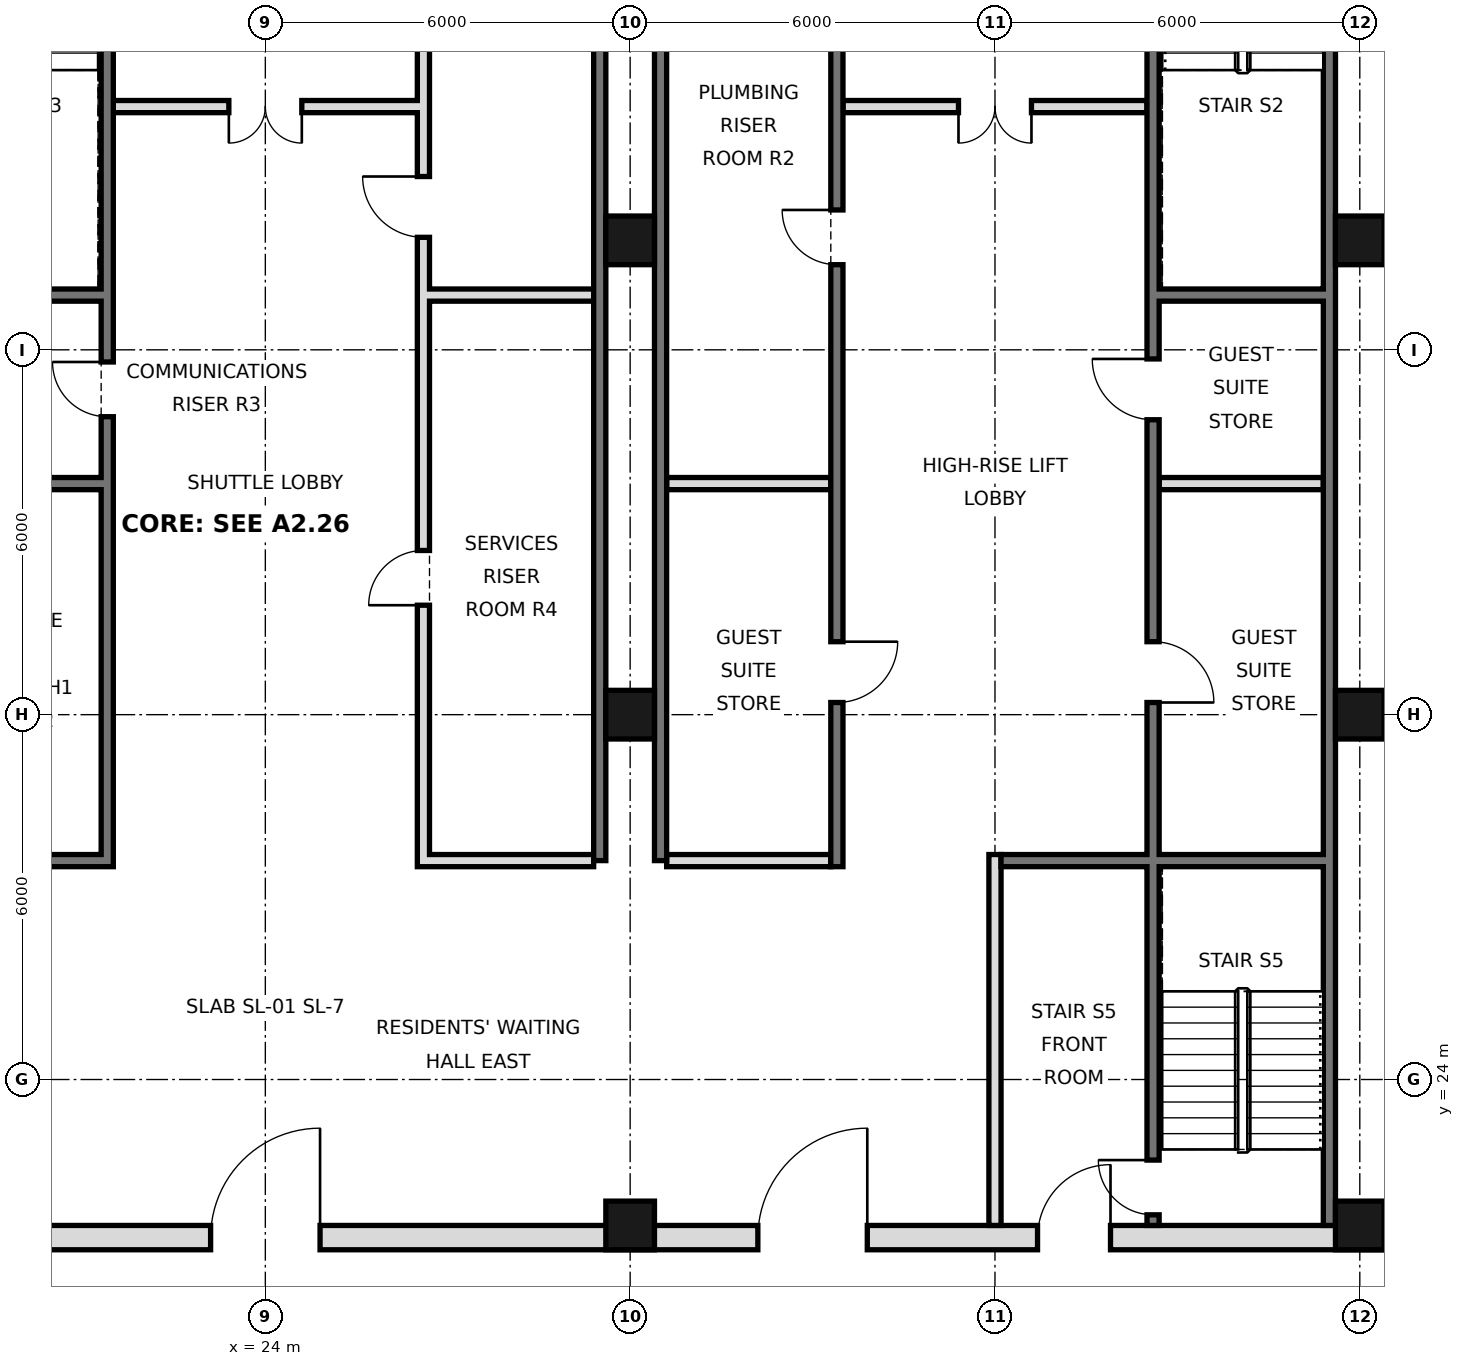
"""IFC4 building model, lengths in metres.
Left out: names, types, materials, properties, quantities, classifications, styles, units other than length and angle.
Written with IfcOpenShell. Run it as: python <this file> out.ifc"""

import sys

from ifc_helpers import new_model, si_unit, direction, frame, frame_2d, origin, origin_2d, place, context, subcontext, project, spatial, rectangle, hollow_rectangle, extrude, element, fill, save


model = new_model("IFC4")
c1 = context("Model", 3, precision=1e-05, world=origin(), true_north=direction((0.0, 1.0)))
c2 = subcontext(c1, "Body", "Model", "MODEL_VIEW")
j1 = project(units=[si_unit("LENGTHUNIT", "METRE"), si_unit("PLANEANGLEUNIT", "RADIAN")], contexts=[c1])
p1 = place(None, origin())
s1 = spatial("IfcSite", under=j1, at=p1, CompositionType="ELEMENT")
p2 = place(p1, origin())
s2 = spatial("IfcBuilding", under=s1, at=p2, CompositionType="ELEMENT")
p3 = place(p2, frame((0.0, 0.0, 103.4)))
s3 = spatial("IfcBuildingStorey", under=s2, at=p3, CompositionType="ELEMENT", Elevation=103.4)
for number, where, z_axis, x_axis in (
    (1, (30.0, 21.6, 0.0), (0.0, 0.0, 1.0), (1.0, 0.0, 0.0)),
    (2, (30.0, 30.0, 0.0), (0.0, 0.0, 1.0), (1.0, 0.0, 0.0)),
    (3, (30.0, 37.8, 0.0), (0.0, 0.0, 1.0), (1.0, 0.0, 0.0)),
    (4, (42.0, 21.6, 0.0), (0.0, 0.0, 1.0), (1.0, 0.0, 0.0)),
    (5, (42.0, 30.0, 0.0), (0.0, 0.0, 1.0), (1.0, 0.0, 0.0)),
    (6, (42.0, 37.8, 0.0), (0.0, 0.0, 1.0), (1.0, 0.0, 0.0)),
):
    element("IfcColumn", number, at=place(p3, frame(where, z_axis=z_axis, x_axis=x_axis)), inside=s3, PredefinedType="COLUMN", context=c2, shape_type="SweptSolid", body=[
        extrude(hollow_rectangle(XDim=0.8, YDim=0.8, WallThickness=0.05, at=origin_2d()), origin(), (0.0, 0.0, 1.0), 3.6),
    ])
p4 = place(p3, frame((41.5, 21.6, 0.0), z_axis=(0.0, 0.0, 1.0), x_axis=(0.0, 1.0, 0.0)))
e7 = element("IfcWall", 7, at=p4, inside=s3, PredefinedType="SOLIDWALL", context=c2, shape_type="SweptSolid", body=[
    extrude(rectangle(XDim=23.5, YDim=0.2, at=frame_2d((11.75, 0.0))), origin(), (0.0, 0.0, 1.0), 3.42),
])
for number, where, z_axis, x_axis in (
    (8, (29.5, 27.6, 0.0), (0.0, 0.0, 1.0), (0.0, 1.0, 0.0)),
    (9, (30.5, 27.6, 0.0), (0.0, 0.0, 1.0), (0.0, 1.0, 0.0)),
):
    element("IfcWall", number, at=place(p3, frame(where, z_axis=z_axis, x_axis=x_axis)), inside=s3, PredefinedType="SOLIDWALL", context=c2, shape_type="SweptSolid", body=[
        extrude(rectangle(XDim=17.5, YDim=0.2, at=frame_2d((8.75, 0.0))), origin(), (0.0, 0.0, 1.0), 3.42),
    ])
p5 = place(p3, frame((5.6, 21.4, 0.0), z_axis=(0.0, 0.0, 1.0), x_axis=(1.0, 0.0, 0.0)))
e10 = element("IfcWall", 10, at=p5, inside=s3, PredefinedType="SOLIDWALL", context=c2, shape_type="SweptSolid", body=[
    extrude(rectangle(XDim=36.8, YDim=0.4, at=frame_2d((18.4, 0.0))), origin(), (0.0, 0.0, 1.0), 3.42),
])
p6 = place(p5, frame((8.5, 0.0, 0.0)))
e11 = element("IfcOpeningElement", 11, at=p6, cuts=e10, PredefinedType="OPENING", context=c2, shape_type="SweptSolid", body=[
    extrude(rectangle(XDim=1.8, YDim=2.1, at=frame_2d((0.9, 1.05))), frame((0.0, 0.21, 0.0), z_axis=(0.0, -1.0, 0.0), x_axis=(1.0, 0.0, 0.0)), (0.0, 0.0, 1.0), 0.42),
])
p7 = place(p5, frame((17.5, 0.0, 0.0)))
e12 = element("IfcOpeningElement", 12, at=p7, cuts=e10, PredefinedType="OPENING", context=c2, shape_type="SweptSolid", body=[
    extrude(rectangle(XDim=1.8, YDim=2.1, at=frame_2d((0.9, 1.05))), frame((0.0, 0.21, 0.0), z_axis=(0.0, -1.0, 0.0), x_axis=(1.0, 0.0, 0.0)), (0.0, 0.0, 1.0), 0.42),
])
p8 = place(p5, frame((26.5, 0.0, 0.0)))
e13 = element("IfcOpeningElement", 13, at=p8, cuts=e10, PredefinedType="OPENING", context=c2, shape_type="SweptSolid", body=[
    extrude(rectangle(XDim=1.8, YDim=2.1, at=frame_2d((0.9, 1.05))), frame((0.0, 0.21, 0.0), z_axis=(0.0, -1.0, 0.0), x_axis=(1.0, 0.0, 0.0)), (0.0, 0.0, 1.0), 0.42),
])
p9 = place(p5, frame((4.5, 0.0, 0.0)))
e14 = element("IfcOpeningElement", 14, at=p9, cuts=e10, PredefinedType="OPENING", context=c2, shape_type="SweptSolid", body=[
    extrude(rectangle(XDim=1.2, YDim=2.1, at=frame_2d((0.6, 1.05))), frame((0.0, 0.21, 0.0), z_axis=(0.0, -1.0, 0.0), x_axis=(1.0, 0.0, 0.0)), (0.0, 0.0, 1.0), 0.42),
])
p10 = place(p5, frame((31.1, 0.0, 0.0)))
e15 = element("IfcOpeningElement", 15, at=p10, cuts=e10, PredefinedType="OPENING", context=c2, shape_type="SweptSolid", body=[
    extrude(rectangle(XDim=1.2, YDim=2.1, at=frame_2d((0.6, 1.05))), frame((0.0, 0.21, 0.0), z_axis=(0.0, -1.0, 0.0), x_axis=(1.0, 0.0, 0.0)), (0.0, 0.0, 1.0), 0.42),
])
p11 = place(p3, frame((21.4, 27.5, 0.0), z_axis=(0.0, 0.0, 1.0), x_axis=(0.0, 1.0, 0.0)))
e16 = element("IfcWall", 16, at=p11, inside=s3, PredefinedType="SOLIDWALL", context=c2, shape_type="SweptSolid", body=[
    extrude(rectangle(XDim=17.5, YDim=0.2, at=frame_2d((8.75, 0.0))), origin(), (0.0, 0.0, 1.0), 3.42),
])
p12 = place(p11, frame((16.2, 0.0, 0.0)))
e17 = element("IfcOpeningElement", 17, at=p12, cuts=e16, PredefinedType="OPENING", context=c2, shape_type="SweptSolid", body=[
    extrude(rectangle(XDim=1.0, YDim=2.1, at=frame_2d((0.5, 1.05))), frame((0.0, 0.11, 0.0), z_axis=(0.0, -1.0, 0.0), x_axis=(1.0, 0.0, 0.0)), (0.0, 0.0, 1.0), 0.22),
])
p13 = place(p11, frame((7.4, 0.0, 0.0)))
e18 = element("IfcOpeningElement", 18, at=p13, cuts=e16, PredefinedType="OPENING", context=c2, shape_type="SweptSolid", body=[
    extrude(rectangle(XDim=0.9, YDim=2.1, at=frame_2d((0.45, 1.05))), frame((0.0, 0.11, 0.0), z_axis=(0.0, -1.0, 0.0), x_axis=(1.0, 0.0, 0.0)), (0.0, 0.0, 1.0), 0.22),
])
p14 = place(p3, frame((26.6, 27.5, 0.0), z_axis=(0.0, 0.0, 1.0), x_axis=(0.0, 1.0, 0.0)))
e19 = element("IfcWall", 19, at=p14, inside=s3, PredefinedType="SOLIDWALL", context=c2, shape_type="SweptSolid", body=[
    extrude(rectangle(XDim=17.5, YDim=0.2, at=frame_2d((8.75, 0.0))), origin(), (0.0, 0.0, 1.0), 3.42),
])
p15 = place(p14, frame((4.3, 0.0, 0.0)))
e20 = element("IfcOpeningElement", 20, at=p15, cuts=e19, PredefinedType="OPENING", context=c2, shape_type="SweptSolid", body=[
    extrude(rectangle(XDim=0.9, YDim=2.1, at=frame_2d((0.45, 1.05))), frame((0.0, 0.11, 0.0), z_axis=(0.0, -1.0, 0.0), x_axis=(1.0, 0.0, 0.0)), (0.0, 0.0, 1.0), 0.22),
])
p16 = place(p14, frame((10.35, 0.0, 0.0)))
e21 = element("IfcOpeningElement", 21, at=p16, cuts=e19, PredefinedType="OPENING", context=c2, shape_type="SweptSolid", body=[
    extrude(rectangle(XDim=1.0, YDim=2.1, at=frame_2d((0.5, 1.05))), frame((0.0, 0.11, 0.0), z_axis=(0.0, -1.0, 0.0), x_axis=(1.0, 0.0, 0.0)), (0.0, 0.0, 1.0), 0.22),
])
p17 = place(p3, frame((33.4, 27.5, 0.0), z_axis=(0.0, 0.0, 1.0), x_axis=(0.0, 1.0, 0.0)))
e22 = element("IfcWall", 22, at=p17, inside=s3, PredefinedType="SOLIDWALL", context=c2, shape_type="SweptSolid", body=[
    extrude(rectangle(XDim=17.5, YDim=0.2, at=frame_2d((8.75, 0.0))), origin(), (0.0, 0.0, 1.0), 3.42),
])
p18 = place(p17, frame((15.4, 0.0, 0.0)))
e23 = element("IfcOpeningElement", 23, at=p18, cuts=e22, PredefinedType="OPENING", context=c2, shape_type="SweptSolid", body=[
    extrude(rectangle(XDim=1.1, YDim=2.1, at=frame_2d((0.55, 1.05))), frame((0.0, 0.11, 0.0), z_axis=(0.0, -1.0, 0.0), x_axis=(1.0, 0.0, 0.0)), (0.0, 0.0, 1.0), 0.22),
])
p19 = place(p17, frame((2.7, 0.0, 0.0)))
e24 = element("IfcOpeningElement", 24, at=p19, cuts=e22, PredefinedType="OPENING", context=c2, shape_type="SweptSolid", body=[
    extrude(rectangle(XDim=1.0, YDim=2.1, at=frame_2d((0.5, 1.05))), frame((0.0, 0.11, 0.0), z_axis=(0.0, -1.0, 0.0), x_axis=(1.0, 0.0, 0.0)), (0.0, 0.0, 1.0), 0.22),
])
p20 = place(p17, frame((9.9, 0.0, 0.0)))
e25 = element("IfcOpeningElement", 25, at=p20, cuts=e22, PredefinedType="OPENING", context=c2, shape_type="SweptSolid", body=[
    extrude(rectangle(XDim=0.9, YDim=2.1, at=frame_2d((0.45, 1.05))), frame((0.0, 0.11, 0.0), z_axis=(0.0, -1.0, 0.0), x_axis=(1.0, 0.0, 0.0)), (0.0, 0.0, 1.0), 0.22),
])
p21 = place(p3, frame((36.0, 21.6, 0.0), z_axis=(0.0, 0.0, 1.0), x_axis=(0.0, 1.0, 0.0)))
e26 = element("IfcWall", 26, at=p21, inside=s3, PredefinedType="PARTITIONING", context=c2, shape_type="SweptSolid", body=[
    extrude(rectangle(XDim=6.1, YDim=0.2, at=frame_2d((3.05, 0.0))), origin(), (0.0, 0.0, 1.0), 3.42),
])
p22 = place(p3, frame((38.6, 21.6, 0.0), z_axis=(0.0, 0.0, 1.0), x_axis=(0.0, 1.0, 0.0)))
e27 = element("IfcWall", 27, at=p22, inside=s3, PredefinedType="SOLIDWALL", context=c2, shape_type="SweptSolid", body=[
    extrude(rectangle(XDim=23.4, YDim=0.2, at=frame_2d((11.7, 0.0))), origin(), (0.0, 0.0, 1.0), 3.42),
])
p23 = place(p22, frame((8.6, 0.0, 0.0)))
e28 = element("IfcOpeningElement", 28, at=p23, cuts=e27, PredefinedType="OPENING", context=c2, shape_type="SweptSolid", body=[
    extrude(rectangle(XDim=1.0, YDim=2.1, at=frame_2d((0.5, 1.05))), frame((0.0, 0.11, 0.0), z_axis=(0.0, -1.0, 0.0), x_axis=(1.0, 0.0, 0.0)), (0.0, 0.0, 1.0), 0.22),
])
p24 = place(p22, frame((13.25, 0.0, 0.0)))
e29 = element("IfcOpeningElement", 29, at=p24, cuts=e27, PredefinedType="OPENING", context=c2, shape_type="SweptSolid", body=[
    extrude(rectangle(XDim=1.0, YDim=2.1, at=frame_2d((0.5, 1.05))), frame((0.0, 0.11, 0.0), z_axis=(0.0, -1.0, 0.0), x_axis=(1.0, 0.0, 0.0)), (0.0, 0.0, 1.0), 0.22),
])
p25 = place(p22, frame((22.1, 0.0, 0.0)))
e30 = element("IfcOpeningElement", 30, at=p25, cuts=e27, PredefinedType="OPENING", context=c2, shape_type="SweptSolid", body=[
    extrude(rectangle(XDim=1.0, YDim=2.1, at=frame_2d((0.5, 1.05))), frame((0.0, 0.11, 0.0), z_axis=(0.0, -1.0, 0.0), x_axis=(1.0, 0.0, 0.0)), (0.0, 0.0, 1.0), 0.22),
])
p26 = place(p22, frame((0.175, 0.0, 0.0)))
e31 = element("IfcOpeningElement", 31, at=p26, cuts=e27, PredefinedType="OPENING", context=c2, shape_type="SweptSolid", body=[
    extrude(rectangle(XDim=0.9, YDim=2.1, at=frame_2d((0.45, 1.05))), frame((0.0, 0.11, 0.0), z_axis=(0.0, -1.0, 0.0), x_axis=(1.0, 0.0, 0.0)), (0.0, 0.0, 1.0), 0.22),
])
for number, where, z_axis, x_axis in (
    (32, (18.6, 27.6, 0.0), (0.0, 0.0, 1.0), (1.0, 0.0, 0.0)),
    (33, (26.7, 27.6, 0.0), (0.0, 0.0, 1.0), (1.0, 0.0, 0.0)),
):
    element("IfcWall", number, at=place(p3, frame(where, z_axis=z_axis, x_axis=x_axis)), inside=s3, PredefinedType="SOLIDWALL", context=c2, shape_type="SweptSolid", body=[
        extrude(rectangle(XDim=2.7, YDim=0.2, at=frame_2d((1.35, 0.0))), origin(), (0.0, 0.0, 1.0), 3.42),
    ])
p27 = place(p3, frame((30.6, 27.6, 0.0), z_axis=(0.0, 0.0, 1.0), x_axis=(1.0, 0.0, 0.0)))
e34 = element("IfcWall", 34, at=p27, inside=s3, PredefinedType="PARTITIONING", context=c2, shape_type="SweptSolid", body=[
    extrude(rectangle(XDim=2.7, YDim=0.2, at=frame_2d((1.35, 0.0))), origin(), (0.0, 0.0, 1.0), 3.42),
])
p28 = place(p3, frame((36.1, 27.6, 0.0), z_axis=(0.0, 0.0, 1.0), x_axis=(1.0, 0.0, 0.0)))
e35 = element("IfcWall", 35, at=p28, inside=s3, PredefinedType="SOLIDWALL", context=c2, shape_type="SweptSolid", body=[
    extrude(rectangle(XDim=5.3, YDim=0.2, at=frame_2d((2.65, 0.0))), origin(), (0.0, 0.0, 1.0), 3.42),
])
for number, where, z_axis, x_axis in (
    (36, (18.6, 33.8, 0.0), (0.0, 0.0, 1.0), (1.0, 0.0, 0.0)),
    (37, (30.6, 33.8, 0.0), (0.0, 0.0, 1.0), (1.0, 0.0, 0.0)),
):
    element("IfcWall", number, at=place(p3, frame(where, z_axis=z_axis, x_axis=x_axis)), inside=s3, PredefinedType="SOLIDWALL", context=c2, shape_type="SweptSolid", body=[
        extrude(rectangle(XDim=2.7, YDim=0.2, at=frame_2d((1.35, 0.0))), origin(), (0.0, 0.0, 1.0), 3.42),
    ])
p29 = place(p3, frame((38.7, 33.8, 0.0), z_axis=(0.0, 0.0, 1.0), x_axis=(1.0, 0.0, 0.0)))
e38 = element("IfcWall", 38, at=p29, inside=s3, PredefinedType="PARTITIONING", context=c2, shape_type="SweptSolid", body=[
    extrude(rectangle(XDim=2.7, YDim=0.2, at=frame_2d((1.35, 0.0))), origin(), (0.0, 0.0, 1.0), 3.42),
])
for number, where, z_axis, x_axis in (
    (39, (18.6, 36.9, 0.0), (0.0, 0.0, 1.0), (1.0, 0.0, 0.0)),
    (40, (26.7, 36.9, 0.0), (0.0, 0.0, 1.0), (1.0, 0.0, 0.0)),
    (41, (38.7, 36.9, 0.0), (0.0, 0.0, 1.0), (1.0, 0.0, 0.0)),
):
    element("IfcWall", number, at=place(p3, frame(where, z_axis=z_axis, x_axis=x_axis)), inside=s3, PredefinedType="SOLIDWALL", context=c2, shape_type="SweptSolid", body=[
        extrude(rectangle(XDim=2.7, YDim=0.2, at=frame_2d((1.35, 0.0))), origin(), (0.0, 0.0, 1.0), 3.42),
    ])
p30 = place(p3, frame((21.5, 40.0, 0.0), z_axis=(0.0, 0.0, 1.0), x_axis=(1.0, 0.0, 0.0)))
e42 = element("IfcWall", 42, at=p30, inside=s3, PredefinedType="PARTITIONING", context=c2, shape_type="SweptSolid", body=[
    extrude(rectangle(XDim=5.0, YDim=0.2, at=frame_2d((2.5, 0.0))), origin(), (0.0, 0.0, 1.0), 3.42),
])
p31 = place(p30, frame((1.9, 0.0, 0.0)))
e43 = element("IfcOpeningElement", 43, at=p31, cuts=e42, PredefinedType="OPENING", context=c2, shape_type="SweptSolid", body=[
    extrude(rectangle(XDim=1.2, YDim=2.1, at=frame_2d((0.6, 1.05))), frame((0.0, 0.11, 0.0), z_axis=(0.0, -1.0, 0.0), x_axis=(1.0, 0.0, 0.0)), (0.0, 0.0, 1.0), 0.22),
])
p32 = place(p3, frame((33.5, 40.0, 0.0), z_axis=(0.0, 0.0, 1.0), x_axis=(1.0, 0.0, 0.0)))
e44 = element("IfcWall", 44, at=p32, inside=s3, PredefinedType="PARTITIONING", context=c2, shape_type="SweptSolid", body=[
    extrude(rectangle(XDim=5.0, YDim=0.2, at=frame_2d((2.5, 0.0))), origin(), (0.0, 0.0, 1.0), 3.42),
])
p33 = place(p32, frame((1.9, 0.0, 0.0)))
e45 = element("IfcOpeningElement", 45, at=p33, cuts=e44, PredefinedType="OPENING", context=c2, shape_type="SweptSolid", body=[
    extrude(rectangle(XDim=1.2, YDim=2.1, at=frame_2d((0.6, 1.05))), frame((0.0, 0.11, 0.0), z_axis=(0.0, -1.0, 0.0), x_axis=(1.0, 0.0, 0.0)), (0.0, 0.0, 1.0), 0.22),
])
p34 = place(p7, frame((1.8, 0.0, 0.0), z_axis=(0.0, 0.0, 1.0), x_axis=(-1.0, 0.0, 0.0)))
e46 = element("IfcDoor", 46, at=p34, inside=s3, OperationType="SINGLE_SWING_LEFT", PredefinedType="DOOR", context=c2, shape_type="SweptSolid", body=[
    extrude(rectangle(XDim=1.8, YDim=2.1, at=frame_2d((0.9, 1.05))), frame((0.0, 0.025, 0.0), z_axis=(0.0, -1.0, 0.0), x_axis=(1.0, 0.0, 0.0)), (0.0, 0.0, 1.0), 0.05),
])
fill(e12, e46)
p35 = place(p8, frame((1.8, 0.0, 0.0), z_axis=(0.0, 0.0, 1.0), x_axis=(-1.0, 0.0, 0.0)))
e47 = element("IfcDoor", 47, at=p35, inside=s3, OperationType="SINGLE_SWING_LEFT", PredefinedType="DOOR", context=c2, shape_type="SweptSolid", body=[
    extrude(rectangle(XDim=1.8, YDim=2.1, at=frame_2d((0.9, 1.05))), frame((0.0, 0.025, 0.0), z_axis=(0.0, -1.0, 0.0), x_axis=(1.0, 0.0, 0.0)), (0.0, 0.0, 1.0), 0.05),
])
fill(e13, e47)
p36 = place(p10, frame((1.2, 0.0, 0.0), z_axis=(0.0, 0.0, 1.0), x_axis=(-1.0, 0.0, 0.0)))
e48 = element("IfcDoor", 48, at=p36, inside=s3, OperationType="SINGLE_SWING_LEFT", PredefinedType="DOOR", context=c2, shape_type="SweptSolid", body=[
    extrude(rectangle(XDim=1.2, YDim=2.1, at=frame_2d((0.6, 1.05))), frame((0.0, 0.025, 0.0), z_axis=(0.0, -1.0, 0.0), x_axis=(1.0, 0.0, 0.0)), (0.0, 0.0, 1.0), 0.05),
])
fill(e15, e48)
p37 = place(p31, frame((1.2, 0.0, 0.0), z_axis=(0.0, 0.0, 1.0), x_axis=(-1.0, 0.0, 0.0)))
e49 = element("IfcDoor", 49, at=p37, inside=s3, OperationType="DOUBLE_DOOR_SINGLE_SWING", PredefinedType="DOOR", context=c2, shape_type="SweptSolid", body=[
    extrude(rectangle(XDim=1.2, YDim=2.1, at=frame_2d((0.6, 1.05))), frame((0.0, 0.025, 0.0), z_axis=(0.0, -1.0, 0.0), x_axis=(1.0, 0.0, 0.0)), (0.0, 0.0, 1.0), 0.05),
])
fill(e43, e49)
p38 = place(p33, frame((1.2, 0.0, 0.0), z_axis=(0.0, 0.0, 1.0), x_axis=(-1.0, 0.0, 0.0)))
e50 = element("IfcDoor", 50, at=p38, inside=s3, OperationType="DOUBLE_DOOR_SINGLE_SWING", PredefinedType="DOOR", context=c2, shape_type="SweptSolid", body=[
    extrude(rectangle(XDim=1.2, YDim=2.1, at=frame_2d((0.6, 1.05))), frame((0.0, 0.025, 0.0), z_axis=(0.0, -1.0, 0.0), x_axis=(1.0, 0.0, 0.0)), (0.0, 0.0, 1.0), 0.05),
])
fill(e45, e50)
p39 = place(p23, frame((1.0, 0.0, 0.0), z_axis=(0.0, 0.0, 1.0), x_axis=(-1.0, 0.0, 0.0)))
e51 = element("IfcDoor", 51, at=p39, inside=s3, OperationType="SINGLE_SWING_RIGHT", PredefinedType="DOOR", context=c2, shape_type="SweptSolid", body=[
    extrude(rectangle(XDim=1.0, YDim=2.1, at=frame_2d((0.5, 1.05))), frame((0.0, 0.025, 0.0), z_axis=(0.0, -1.0, 0.0), x_axis=(1.0, 0.0, 0.0)), (0.0, 0.0, 1.0), 0.05),
])
fill(e28, e51)
p40 = place(p24, frame((1.0, 0.0, 0.0), z_axis=(0.0, 0.0, 1.0), x_axis=(-1.0, 0.0, 0.0)))
e52 = element("IfcDoor", 52, at=p40, inside=s3, OperationType="SINGLE_SWING_LEFT", PredefinedType="DOOR", context=c2, shape_type="SweptSolid", body=[
    extrude(rectangle(XDim=1.0, YDim=2.1, at=frame_2d((0.5, 1.05))), frame((0.0, 0.025, 0.0), z_axis=(0.0, -1.0, 0.0), x_axis=(1.0, 0.0, 0.0)), (0.0, 0.0, 1.0), 0.05),
])
fill(e29, e52)
p41 = place(p19, origin())
e53 = element("IfcDoor", 53, at=p41, inside=s3, OperationType="SINGLE_SWING_RIGHT", PredefinedType="DOOR", context=c2, shape_type="SweptSolid", body=[
    extrude(rectangle(XDim=1.0, YDim=2.1, at=frame_2d((0.5, 1.05))), frame((0.0, 0.025, 0.0), z_axis=(0.0, -1.0, 0.0), x_axis=(1.0, 0.0, 0.0)), (0.0, 0.0, 1.0), 0.05),
])
fill(e24, e53)
p42 = place(p26, frame((0.9, 0.0, 0.0), z_axis=(0.0, 0.0, 1.0), x_axis=(-1.0, 0.0, 0.0)))
e54 = element("IfcDoor", 54, at=p42, inside=s3, OperationType="SINGLE_SWING_LEFT", PredefinedType="DOOR", context=c2, shape_type="SweptSolid", body=[
    extrude(rectangle(XDim=0.9, YDim=2.1, at=frame_2d((0.45, 1.05))), frame((0.0, 0.025, 0.0), z_axis=(0.0, -1.0, 0.0), x_axis=(1.0, 0.0, 0.0)), (0.0, 0.0, 1.0), 0.05),
])
fill(e31, e54)
p43 = place(p20, frame((0.9, 0.0, 0.0), z_axis=(0.0, 0.0, 1.0), x_axis=(-1.0, 0.0, 0.0)))
e55 = element("IfcDoor", 55, at=p43, inside=s3, OperationType="SINGLE_SWING_LEFT", PredefinedType="DOOR", context=c2, shape_type="SweptSolid", body=[
    extrude(rectangle(XDim=0.9, YDim=2.1, at=frame_2d((0.45, 1.05))), frame((0.0, 0.025, 0.0), z_axis=(0.0, -1.0, 0.0), x_axis=(1.0, 0.0, 0.0)), (0.0, 0.0, 1.0), 0.05),
])
fill(e25, e55)
p44 = place(p13, frame((0.9, 0.0, 0.0), z_axis=(0.0, 0.0, 1.0), x_axis=(-1.0, 0.0, 0.0)))
e56 = element("IfcDoor", 56, at=p44, inside=s3, OperationType="SINGLE_SWING_LEFT", PredefinedType="DOOR", context=c2, shape_type="SweptSolid", body=[
    extrude(rectangle(XDim=0.9, YDim=2.1, at=frame_2d((0.45, 1.05))), frame((0.0, 0.025, 0.0), z_axis=(0.0, -1.0, 0.0), x_axis=(1.0, 0.0, 0.0)), (0.0, 0.0, 1.0), 0.05),
])
fill(e18, e56)
p45 = place(p15, origin())
e57 = element("IfcDoor", 57, at=p45, inside=s3, OperationType="SINGLE_SWING_LEFT", PredefinedType="DOOR", context=c2, shape_type="SweptSolid", body=[
    extrude(rectangle(XDim=0.9, YDim=2.1, at=frame_2d((0.45, 1.05))), frame((0.0, 0.025, 0.0), z_axis=(0.0, -1.0, 0.0), x_axis=(1.0, 0.0, 0.0)), (0.0, 0.0, 1.0), 0.05),
])
fill(e20, e57)
p46 = place(p16, frame((1.0, 0.0, 0.0), z_axis=(0.0, 0.0, 1.0), x_axis=(-1.0, 0.0, 0.0)))
e58 = element("IfcDoor", 58, at=p46, inside=s3, OperationType="SINGLE_SWING_LEFT", PredefinedType="DOOR", context=c2, shape_type="SweptSolid", body=[
    extrude(rectangle(XDim=1.0, YDim=2.1, at=frame_2d((0.5, 1.05))), frame((0.0, 0.025, 0.0), z_axis=(0.0, -1.0, 0.0), x_axis=(1.0, 0.0, 0.0)), (0.0, 0.0, 1.0), 0.05),
])
fill(e21, e58)
save(model, sys.argv[1])
